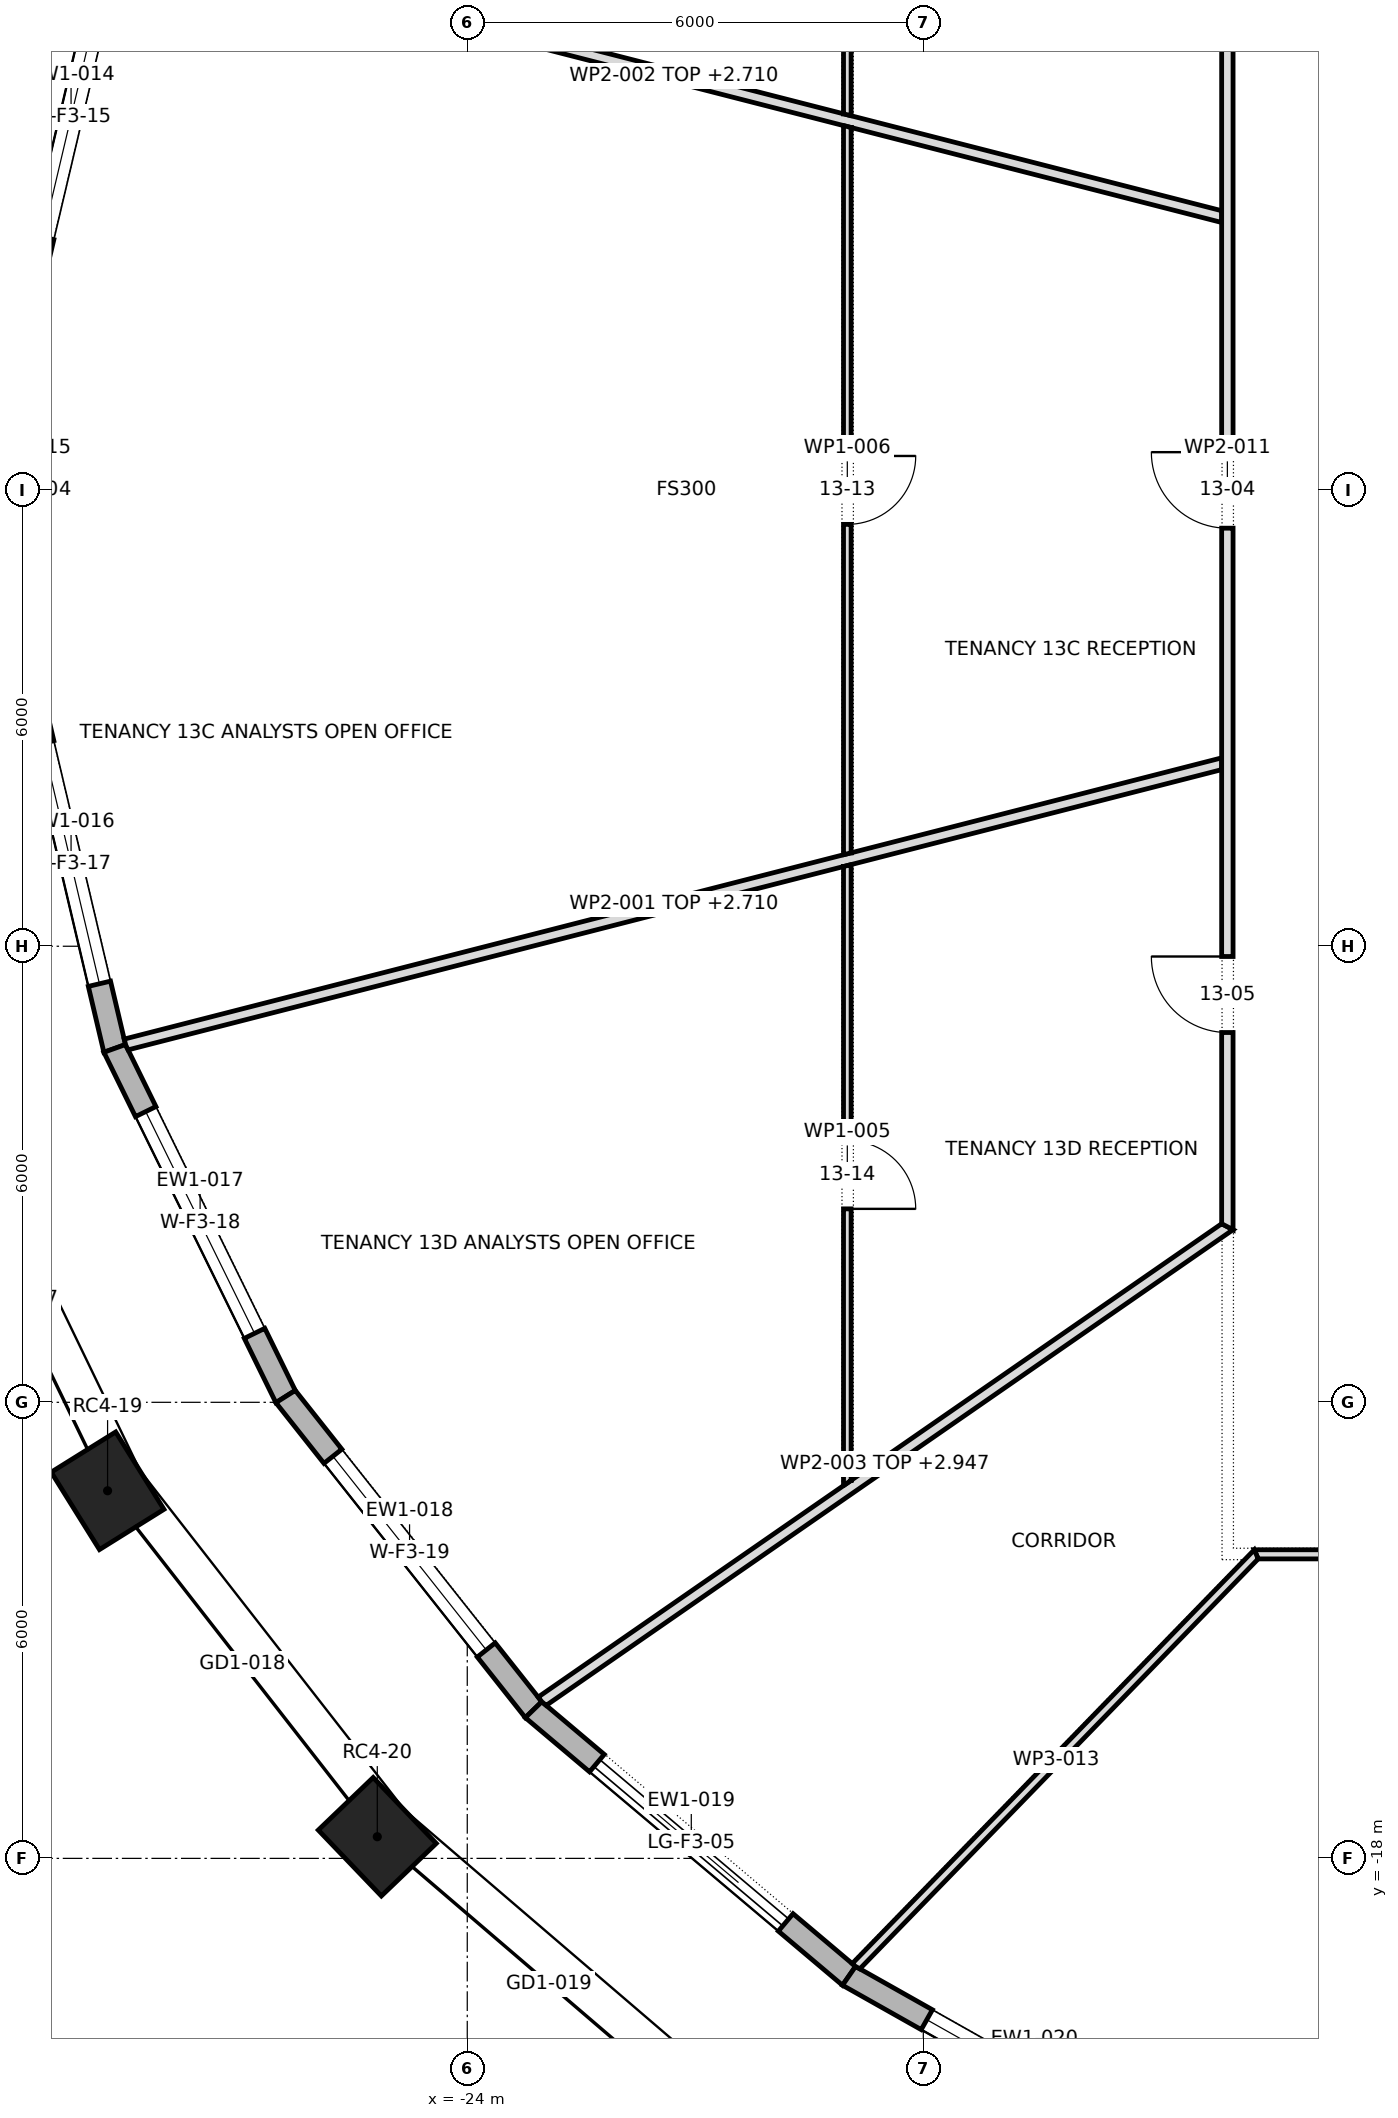
"""IFC4 building model, lengths in metres.
Left out: names, types, materials, properties, quantities, classifications, styles, units other than length and angle.
Written with IfcOpenShell. Run it as: python <this file> out.ifc"""

import sys

from ifc_helpers import new_model, si_unit, direction, frame, frame_2d, origin, origin_2d, place, context, subcontext, project, spatial, polyline, rectangle, outline, extrude, element, fill, save


model = new_model("IFC4")
c1 = context("Model", 3, precision=1e-05, world=origin(), true_north=direction((0.0, 1.0)))
c2 = subcontext(c1, "Body", "Model", "MODEL_VIEW")
j1 = project(units=[si_unit("LENGTHUNIT", "METRE"), si_unit("PLANEANGLEUNIT", "RADIAN")], contexts=[c1])
p1 = place(None, origin())
s1 = spatial("IfcSite", under=j1, at=p1, CompositionType="ELEMENT")
p2 = place(p1, origin())
s2 = spatial("IfcBuilding", under=s1, at=p2, CompositionType="ELEMENT")
p3 = place(p2, frame((0.0, 0.0, 190.9)))
s3 = spatial("IfcBuildingStorey", under=s2, at=p3, CompositionType="ELEMENT", Elevation=190.9)
for number, where, z_axis, x_axis in (
    (1, (-28.732, -13.164, 0.0), (0.0, 0.0, 1.0), (0.529, -0.849, 0.0)),
    (2, (-25.184, -17.715, 0.0), (0.0, 0.0, 1.0), (0.692, -0.722, 0.0)),
):
    element("IfcColumn", number, at=place(p3, frame(where, z_axis=z_axis, x_axis=x_axis)), inside=s3, PredefinedType="COLUMN", context=c2, shape_type="SweptSolid", body=[
        extrude(rectangle(XDim=1.2, YDim=1.0, at=origin_2d()), origin(), (0.0, 0.0, 1.0), 4.0),
    ])
p4 = place(p3, frame((-28.639, 7.344, 0.0), z_axis=(0.0, 0.0, 1.0), x_axis=(-0.229455912692, -0.97331905567, 0.0)))
e3 = element("IfcWall", 3, at=p4, inside=s3, PredefinedType="STANDARD", context=c2, shape_type="SweptSolid", body=[
    extrude(outline(polyline([(-0.017, -0.15), (5.015, -0.15), (4.98, 0.15), (0.017, 0.15), (-0.017, -0.15)])), origin(), (0.0, 0.0, 1.0), 3.7),
])
p5 = place(p4, frame((0.874, 0.0, 0.6)))
e4 = element("IfcOpeningElement", 4, at=p5, cuts=e3, PredefinedType="OPENING", context=c2, shape_type="SweptSolid", body=[
    extrude(rectangle(XDim=3.25, YDim=2.65, at=frame_2d((1.625, 1.325))), frame((0.0, 0.162, 0.0), z_axis=(0.0, -1.0, 0.0), x_axis=(1.0, 0.0, 0.0)), (0.0, 0.0, 1.0), 0.324),
])
p6 = place(p3, frame((-29.785, -2.48, 0.0), z_axis=(0.0, 0.0, 1.0), x_axis=(0.229455912692, -0.97331905567, 0.0)))
e5 = element("IfcWall", 5, at=p6, inside=s3, PredefinedType="STANDARD", context=c2, shape_type="SweptSolid", body=[
    extrude(outline(polyline([(-0.017, -0.15), (5.014, -0.15), (4.981, 0.15), (0.017, 0.15), (-0.017, -0.15)])), origin(), (0.0, 0.0, 1.0), 3.7),
])
p7 = place(p6, frame((0.874, 0.0, 0.6)))
e6 = element("IfcOpeningElement", 6, at=p7, cuts=e5, PredefinedType="OPENING", context=c2, shape_type="SweptSolid", body=[
    extrude(rectangle(XDim=3.25, YDim=2.65, at=frame_2d((1.625, 1.325))), frame((0.0, 0.162, 0.0), z_axis=(0.0, -1.0, 0.0), x_axis=(1.0, 0.0, 0.0)), (0.0, 0.0, 1.0), 0.324),
])
p8 = place(p3, frame((-28.639, -7.344, 0.0), z_axis=(0.0, 0.0, 1.0), x_axis=(0.440694221881, -0.897657285829, 0.0)))
e7 = element("IfcWall", 7, at=p8, inside=s3, PredefinedType="STANDARD", context=c2, shape_type="SweptSolid", body=[
    extrude(outline(polyline([(-0.017, -0.15), (5.118, -0.15), (5.086, 0.15), (0.017, 0.15), (-0.017, -0.15)])), origin(), (0.0, 0.0, 1.0), 3.7),
])
p9 = place(p8, frame((0.926, 0.0, 0.6)))
e8 = element("IfcOpeningElement", 8, at=p9, cuts=e7, PredefinedType="OPENING", context=c2, shape_type="SweptSolid", body=[
    extrude(rectangle(XDim=3.25, YDim=2.65, at=frame_2d((1.625, 1.325))), frame((0.0, 0.162, 0.0), z_axis=(0.0, -1.0, 0.0), x_axis=(1.0, 0.0, 0.0)), (0.0, 0.0, 1.0), 0.324),
])
p10 = place(p3, frame((-26.39, -11.924, 0.0), z_axis=(0.0, 0.0, 1.0), x_axis=(0.620829074232, -0.783945955145, 0.0)))
e9 = element("IfcWall", 9, at=p10, inside=s3, PredefinedType="STANDARD", context=c2, shape_type="SweptSolid", body=[
    extrude(outline(polyline([(-0.016, -0.15), (5.27, -0.15), (5.24, 0.15), (0.016, 0.15), (-0.016, -0.15)])), origin(), (0.0, 0.0, 1.0), 3.7),
])
p11 = place(p10, frame((1.003, 0.0, 0.6)))
e10 = element("IfcOpeningElement", 10, at=p11, cuts=e9, PredefinedType="OPENING", context=c2, shape_type="SweptSolid", body=[
    extrude(rectangle(XDim=3.25, YDim=2.65, at=frame_2d((1.625, 1.325))), frame((0.0, 0.162, 0.0), z_axis=(0.0, -1.0, 0.0), x_axis=(1.0, 0.0, 0.0)), (0.0, 0.0, 1.0), 0.324),
])
p12 = place(p3, frame((-23.128, -16.044, 0.0), z_axis=(0.0, 0.0, 1.0), x_axis=(0.764330261608, -0.644824977176, 0.0)))
e11 = element("IfcWall", 11, at=p12, inside=s3, PredefinedType="STANDARD", context=c2, shape_type="SweptSolid", body=[
    extrude(outline(polyline([(-0.015, -0.15), (5.444, -0.15), (5.416, 0.15), (0.015, 0.15), (-0.015, -0.15)])), origin(), (0.0, 0.0, 1.0), 3.7),
])
p13 = place(p12, frame((1.09, 0.0, 0.0)))
e12 = element("IfcOpeningElement", 12, at=p13, cuts=e11, PredefinedType="OPENING", context=c2, shape_type="SweptSolid", body=[
    extrude(rectangle(XDim=3.25, YDim=3.25, at=frame_2d((1.625, 1.625))), frame((0.0, 0.162, 0.0), z_axis=(0.0, -1.0, 0.0), x_axis=(1.0, 0.0, 0.0)), (0.0, 0.0, 1.0), 0.324),
])
p14 = place(p3, frame((-18.977, -19.545, 0.0), z_axis=(0.0, 0.0, 1.0), x_axis=(0.871083701819, -0.491134588912, 0.0)))
e13 = element("IfcWall", 13, at=p14, inside=s3, PredefinedType="STANDARD", context=c2, shape_type="SweptSolid", body=[
    extrude(outline(polyline([(-0.014, -0.15), (5.613, -0.15), (5.586, 0.15), (0.014, 0.15), (-0.014, -0.15)])), origin(), (0.0, 0.0, 1.0), 3.7),
])
p15 = place(p14, frame((1.175, 0.0, 0.6)))
e14 = element("IfcOpeningElement", 14, at=p15, cuts=e13, PredefinedType="OPENING", context=c2, shape_type="SweptSolid", body=[
    extrude(rectangle(XDim=3.25, YDim=2.65, at=frame_2d((1.625, 1.325))), frame((0.0, 0.162, 0.0), z_axis=(0.0, -1.0, 0.0), x_axis=(1.0, 0.0, 0.0)), (0.0, 0.0, 1.0), 0.324),
])
p16 = place(p3, frame((-28.494, -7.294, 0.0), z_axis=(0.0, 0.0, 1.0), x_axis=(0.96870063855, 0.248231893342, 0.0)))
e15 = element("IfcWall", 15, at=p16, inside=s3, PredefinedType="PARTITIONING", context=c2, shape_type="SweptSolid", body=[
    extrude(outline(polyline([(0.014, -0.075), (1.957, -0.075), (3.901, -0.075), (5.844, -0.075), (7.787, -0.075), (9.73, -0.075), (9.731, -0.073), (9.736, -0.075), (11.446, -0.075), (13.156, -0.075), (14.866, -0.075), (14.904, 0.074), (14.904, 0.075), (13.227, 0.075), (11.549, 0.075), (9.872, 0.075), (9.872, 0.073), (9.866, 0.075), (7.893, 0.075), (5.92, 0.075), (3.947, 0.075), (1.973, 0.075), (0.0, 0.075), (0.0, -0.008), (0.014, -0.075)])), origin(), (0.0, 0.0, 1.0), 2.71),
])
p17 = place(p3, frame((-28.494, 7.294, 0.0), z_axis=(0.0, 0.0, 1.0), x_axis=(0.96870063855, -0.248231893342, 0.0)))
e16 = element("IfcWall", 16, at=p17, inside=s3, PredefinedType="PARTITIONING", context=c2, shape_type="SweptSolid", body=[
    extrude(outline(polyline([(0.0, -0.075), (1.973, -0.075), (3.947, -0.075), (5.92, -0.075), (7.893, -0.075), (9.866, -0.075), (9.872, -0.073), (9.872, -0.075), (11.549, -0.075), (13.227, -0.075), (14.904, -0.075), (14.904, -0.074), (14.866, 0.075), (13.156, 0.075), (11.446, 0.075), (9.736, 0.075), (9.731, 0.073), (9.73, 0.075), (7.787, 0.075), (5.844, 0.075), (3.901, 0.075), (1.957, 0.075), (0.014, 0.075), (0.0, 0.008), (0.0, -0.075)])), origin(), (0.0, 0.0, 1.0), 2.71),
])
p18 = place(p3, frame((-23.024, -15.94, 0.0), z_axis=(0.0, 0.0, 1.0), x_axis=(0.822097241007, 0.569347105313, 0.0)))
e17 = element("IfcWall", 17, at=p18, inside=s3, PredefinedType="PARTITIONING", context=c2, shape_type="SweptSolid", body=[
    extrude(outline(polyline([(0.024, -0.075), (1.856, -0.075), (3.688, -0.075), (5.52, -0.075), (7.352, -0.075), (9.184, -0.075), (11.016, -0.075), (10.977, -0.0), (10.938, 0.075), (8.961, 0.075), (6.985, 0.075), (5.008, 0.075), (5.006, 0.072), (5.002, 0.075), (3.335, 0.075), (1.667, 0.075), (0.0, 0.075), (0.0, 0.068), (0.005, -0.002), (0.024, -0.075)])), origin(), (0.0, 0.0, 1.0), 2.947),
])
p19 = place(p3, frame((-19.0, -13.095, 0.0), z_axis=(0.0, 0.0, 1.0), x_axis=(0.0, 1.0, 0.0)))
e18 = element("IfcWall", 18, at=p19, inside=s3, PredefinedType="PARTITIONING", context=c2, shape_type="SweptSolid", body=[
    extrude(outline(polyline([(8.169, -0.05), (8.169, -0.049), (8.144, 0.05), (6.515, 0.05), (4.886, 0.05), (3.258, 0.05), (1.629, 0.05), (0.0, 0.05), (0.0, 0.049), (0.069, -0.05), (1.689, -0.05), (3.309, -0.05), (4.929, -0.05), (6.549, -0.05), (8.169, -0.05)])), origin(), (0.0, 0.0, 1.0), 3.7),
])
p20 = place(p19, frame((3.64, 0.0, 0.0)))
e19 = element("IfcOpeningElement", 19, at=p20, cuts=e18, PredefinedType="OPENING", context=c2, shape_type="SweptSolid", body=[
    extrude(rectangle(XDim=0.9, YDim=2.1, at=frame_2d((0.45, 1.05))), frame((0.0, 0.062, 0.0), z_axis=(0.0, -1.0, 0.0), x_axis=(1.0, 0.0, 0.0)), (0.0, 0.0, 1.0), 0.124),
])
p21 = place(p3, frame((-19.0, -4.796, 0.0), z_axis=(0.0, 0.0, 1.0), x_axis=(0.0, 1.0, 0.0)))
e20 = element("IfcWall", 20, at=p21, inside=s3, PredefinedType="PARTITIONING", context=c2, shape_type="SweptSolid", body=[
    extrude(outline(polyline([(0.025, -0.05), (1.934, -0.05), (3.842, -0.05), (5.75, -0.05), (7.659, -0.05), (9.567, -0.05), (9.593, 0.049), (9.593, 0.05), (7.674, 0.05), (5.756, 0.05), (3.837, 0.05), (1.918, 0.05), (0.0, 0.05), (0.0, 0.049), (0.025, -0.05)])), origin(), (0.0, 0.0, 1.0), 3.7),
])
p22 = place(p21, frame((4.346, 0.0, 0.0)))
e21 = element("IfcOpeningElement", 21, at=p22, cuts=e20, PredefinedType="OPENING", context=c2, shape_type="SweptSolid", body=[
    extrude(rectangle(XDim=0.9, YDim=2.1, at=frame_2d((0.45, 1.05))), frame((0.0, 0.062, 0.0), z_axis=(0.0, -1.0, 0.0), x_axis=(1.0, 0.0, 0.0)), (0.0, 0.0, 1.0), 0.124),
])
p23 = place(p3, frame((-19.0, 4.926, 0.0), z_axis=(0.0, 0.0, 1.0), x_axis=(0.0, 1.0, 0.0)))
e22 = element("IfcWall", 22, at=p23, inside=s3, PredefinedType="PARTITIONING", context=c2, shape_type="SweptSolid", body=[
    extrude(outline(polyline([(0.0, -0.05), (1.62, -0.05), (3.239, -0.05), (4.859, -0.05), (6.479, -0.05), (8.098, -0.05), (8.162, 0.043), (8.169, 0.038), (8.177, 0.05), (8.177, 0.05), (6.547, 0.05), (4.917, 0.05), (3.286, 0.05), (1.656, 0.05), (0.025, 0.05), (0.0, -0.049), (0.0, -0.05)])), origin(), (0.0, 0.0, 1.0), 3.7),
])
p24 = place(p23, frame((3.629, 0.0, 0.0)))
e23 = element("IfcOpeningElement", 23, at=p24, cuts=e22, PredefinedType="OPENING", context=c2, shape_type="SweptSolid", body=[
    extrude(rectangle(XDim=0.9, YDim=2.1, at=frame_2d((0.45, 1.05))), frame((0.0, 0.062, 0.0), z_axis=(0.0, -1.0, 0.0), x_axis=(1.0, 0.0, 0.0)), (0.0, 0.0, 1.0), 0.124),
])
p25 = place(p3, frame((-13.646, -14.0, 0.0), z_axis=(0.0, 0.0, 1.0), x_axis=(1.0, 0.0, 0.0)))
e24 = element("IfcWall", 24, at=p25, inside=s3, PredefinedType="PARTITIONING", context=c2, shape_type="SweptSolid", body=[
    extrude(outline(polyline([(12.016, 0.06), (10.299, 0.06), (8.583, 0.06), (6.866, 0.06), (5.15, 0.06), (3.433, 0.06), (1.717, 0.06), (0.0, 0.06), (0.051, -0.06), (2.045, -0.06), (4.039, -0.06), (6.033, -0.06), (8.027, -0.06), (10.021, -0.06), (12.016, -0.06), (12.016, 0.06)])), origin(), (0.0, 0.0, 1.0), 3.7),
])
p26 = place(p25, frame((5.521, 0.0, 0.0)))
e25 = element("IfcOpeningElement", 25, at=p26, cuts=e24, PredefinedType="OPENING", context=c2, shape_type="SweptSolid", body=[
    extrude(rectangle(XDim=1.0, YDim=2.1, at=frame_2d((0.5, 1.05))), frame((0.0, 0.072, 0.0), z_axis=(0.0, -1.0, 0.0), x_axis=(1.0, 0.0, 0.0)), (0.0, 0.0, 1.0), 0.144),
])
p27 = place(p3, frame((-14.0, -9.729, 0.0), z_axis=(0.0, 0.0, 1.0), x_axis=(0.0, 1.0, 0.0)))
e26 = element("IfcWall", 26, at=p27, inside=s3, PredefinedType="PARTITIONING", context=c2, shape_type="SweptSolid", body=[
    extrude(outline(polyline([(19.458, -0.075), (19.458, -0.075), (19.38, 0.075), (17.45, 0.075), (15.52, 0.075), (13.59, 0.075), (11.659, 0.075), (9.729, 0.075), (7.799, 0.075), (5.869, 0.075), (3.939, 0.075), (2.009, 0.075), (0.079, 0.075), (0.0, -0.075), (0.0, -0.075), (1.946, -0.075), (3.892, -0.075), (5.838, -0.075), (7.783, -0.075), (9.729, -0.075), (11.675, -0.075), (13.621, -0.075), (15.567, -0.075), (17.513, -0.075), (19.458, -0.075)])), origin(), (0.0, 0.0, 1.0), 3.7),
])
p28 = place(p27, frame((15.864, 0.0, 0.0)))
e27 = element("IfcOpeningElement", 27, at=p28, cuts=e26, PredefinedType="OPENING", context=c2, shape_type="SweptSolid", body=[
    extrude(rectangle(XDim=1.0, YDim=2.1, at=frame_2d((0.5, 1.05))), frame((0.0, 0.087, 0.0), z_axis=(0.0, -1.0, 0.0), x_axis=(1.0, 0.0, 0.0)), (0.0, 0.0, 1.0), 0.174),
])
p29 = place(p27, frame((9.229, 0.0, 0.0)))
e28 = element("IfcOpeningElement", 28, at=p29, cuts=e26, PredefinedType="OPENING", context=c2, shape_type="SweptSolid", body=[
    extrude(rectangle(XDim=1.0, YDim=2.1, at=frame_2d((0.5, 1.05))), frame((0.0, 0.087, 0.0), z_axis=(0.0, -1.0, 0.0), x_axis=(1.0, 0.0, 0.0)), (0.0, 0.0, 1.0), 0.174),
])
p30 = place(p27, frame((2.594, 0.0, 0.0)))
e29 = element("IfcOpeningElement", 29, at=p30, cuts=e26, PredefinedType="OPENING", context=c2, shape_type="SweptSolid", body=[
    extrude(rectangle(XDim=1.0, YDim=2.1, at=frame_2d((0.5, 1.05))), frame((0.0, 0.087, 0.0), z_axis=(0.0, -1.0, 0.0), x_axis=(1.0, 0.0, 0.0)), (0.0, 0.0, 1.0), 0.174),
])
p31 = place(p3, frame((-13.602, -13.982, 0.0), z_axis=(0.0, 0.0, 1.0), x_axis=(-0.69685470262, -0.717212328001, 0.0)))
e30 = element("IfcWall", 30, at=p31, inside=s3, PredefinedType="PARTITIONING", context=c2, shape_type="SweptSolid", body=[
    extrude(outline(polyline([(7.591, -0.06), (7.591, -0.058), (7.587, -0.003), (7.571, 0.06), (5.691, 0.06), (3.811, 0.06), (1.931, 0.06), (0.051, 0.06), (0.025, 0.0), (0.0, -0.06), (0.0, -0.06), (0.0, -0.06), (1.898, -0.06), (3.796, -0.06), (5.694, -0.06), (7.591, -0.06)])), origin(), (0.0, 0.0, 1.0), 3.7),
])
p32 = place(p5, origin())
e31 = element("IfcWindow", 31, at=p32, inside=s3, PartitioningType="TRIPLE_PANEL_VERTICAL", PredefinedType="WINDOW", context=c2, shape_type="SweptSolid", body=[
    extrude(rectangle(XDim=3.25, YDim=2.65, at=frame_2d((1.625, 1.325))), frame((0.0, 0.03, 0.0), z_axis=(0.0, -1.0, 0.0), x_axis=(1.0, 0.0, 0.0)), (0.0, 0.0, 1.0), 0.06),
])
fill(e4, e31)
p33 = place(p7, origin())
e32 = element("IfcWindow", 32, at=p33, inside=s3, PartitioningType="TRIPLE_PANEL_VERTICAL", PredefinedType="WINDOW", context=c2, shape_type="SweptSolid", body=[
    extrude(rectangle(XDim=3.25, YDim=2.65, at=frame_2d((1.625, 1.325))), frame((0.0, 0.03, 0.0), z_axis=(0.0, -1.0, 0.0), x_axis=(1.0, 0.0, 0.0)), (0.0, 0.0, 1.0), 0.06),
])
fill(e6, e32)
p34 = place(p9, origin())
e33 = element("IfcWindow", 33, at=p34, inside=s3, PartitioningType="TRIPLE_PANEL_VERTICAL", PredefinedType="WINDOW", context=c2, shape_type="SweptSolid", body=[
    extrude(rectangle(XDim=3.25, YDim=2.65, at=frame_2d((1.625, 1.325))), frame((0.0, 0.03, 0.0), z_axis=(0.0, -1.0, 0.0), x_axis=(1.0, 0.0, 0.0)), (0.0, 0.0, 1.0), 0.06),
])
fill(e8, e33)
p35 = place(p11, origin())
e34 = element("IfcWindow", 34, at=p35, inside=s3, PartitioningType="TRIPLE_PANEL_VERTICAL", PredefinedType="WINDOW", context=c2, shape_type="SweptSolid", body=[
    extrude(rectangle(XDim=3.25, YDim=2.65, at=frame_2d((1.625, 1.325))), frame((0.0, 0.03, 0.0), z_axis=(0.0, -1.0, 0.0), x_axis=(1.0, 0.0, 0.0)), (0.0, 0.0, 1.0), 0.06),
])
fill(e10, e34)
p36 = place(p13, origin())
e35 = element("IfcDoor", 35, at=p36, inside=s3, OperationType="DOUBLE_DOOR_SLIDING", PredefinedType="DOOR", context=c2, shape_type="SweptSolid", body=[
    extrude(rectangle(XDim=3.25, YDim=3.25, at=frame_2d((1.625, 1.625))), frame((0.0, 0.025, 0.0), z_axis=(0.0, -1.0, 0.0), x_axis=(1.0, 0.0, 0.0)), (0.0, 0.0, 1.0), 0.05),
])
fill(e12, e35)
p37 = place(p15, origin())
e36 = element("IfcWindow", 36, at=p37, inside=s3, PartitioningType="TRIPLE_PANEL_VERTICAL", PredefinedType="WINDOW", context=c2, shape_type="SweptSolid", body=[
    extrude(rectangle(XDim=3.25, YDim=2.65, at=frame_2d((1.625, 1.325))), frame((0.0, 0.03, 0.0), z_axis=(0.0, -1.0, 0.0), x_axis=(1.0, 0.0, 0.0)), (0.0, 0.0, 1.0), 0.06),
])
fill(e14, e36)
p38 = place(p29, origin())
e37 = element("IfcDoor", 37, at=p38, inside=s3, OperationType="SINGLE_SWING_LEFT", PredefinedType="DOOR", context=c2, shape_type="SweptSolid", body=[
    extrude(rectangle(XDim=1.0, YDim=2.1, at=frame_2d((0.5, 1.05))), frame((0.0, 0.025, 0.0), z_axis=(0.0, -1.0, 0.0), x_axis=(1.0, 0.0, 0.0)), (0.0, 0.0, 1.0), 0.05),
])
fill(e28, e37)
p39 = place(p30, origin())
e38 = element("IfcDoor", 38, at=p39, inside=s3, OperationType="SINGLE_SWING_LEFT", PredefinedType="DOOR", context=c2, shape_type="SweptSolid", body=[
    extrude(rectangle(XDim=1.0, YDim=2.1, at=frame_2d((0.5, 1.05))), frame((0.0, 0.025, 0.0), z_axis=(0.0, -1.0, 0.0), x_axis=(1.0, 0.0, 0.0)), (0.0, 0.0, 1.0), 0.05),
])
fill(e29, e38)
p40 = place(p22, frame((0.9, 0.0, 0.0), z_axis=(0.0, 0.0, 1.0), x_axis=(-1.0, 0.0, 0.0)))
e39 = element("IfcDoor", 39, at=p40, inside=s3, OperationType="SINGLE_SWING_RIGHT", PredefinedType="DOOR", context=c2, shape_type="SweptSolid", body=[
    extrude(rectangle(XDim=0.9, YDim=2.1, at=frame_2d((0.45, 1.05))), frame((0.0, 0.025, 0.0), z_axis=(0.0, -1.0, 0.0), x_axis=(1.0, 0.0, 0.0)), (0.0, 0.0, 1.0), 0.05),
])
fill(e21, e39)
p41 = place(p20, frame((0.9, 0.0, 0.0), z_axis=(0.0, 0.0, 1.0), x_axis=(-1.0, 0.0, 0.0)))
e40 = element("IfcDoor", 40, at=p41, inside=s3, OperationType="SINGLE_SWING_LEFT", PredefinedType="DOOR", context=c2, shape_type="SweptSolid", body=[
    extrude(rectangle(XDim=0.9, YDim=2.1, at=frame_2d((0.45, 1.05))), frame((0.0, 0.025, 0.0), z_axis=(0.0, -1.0, 0.0), x_axis=(1.0, 0.0, 0.0)), (0.0, 0.0, 1.0), 0.05),
])
fill(e19, e40)
save(model, sys.argv[1])
